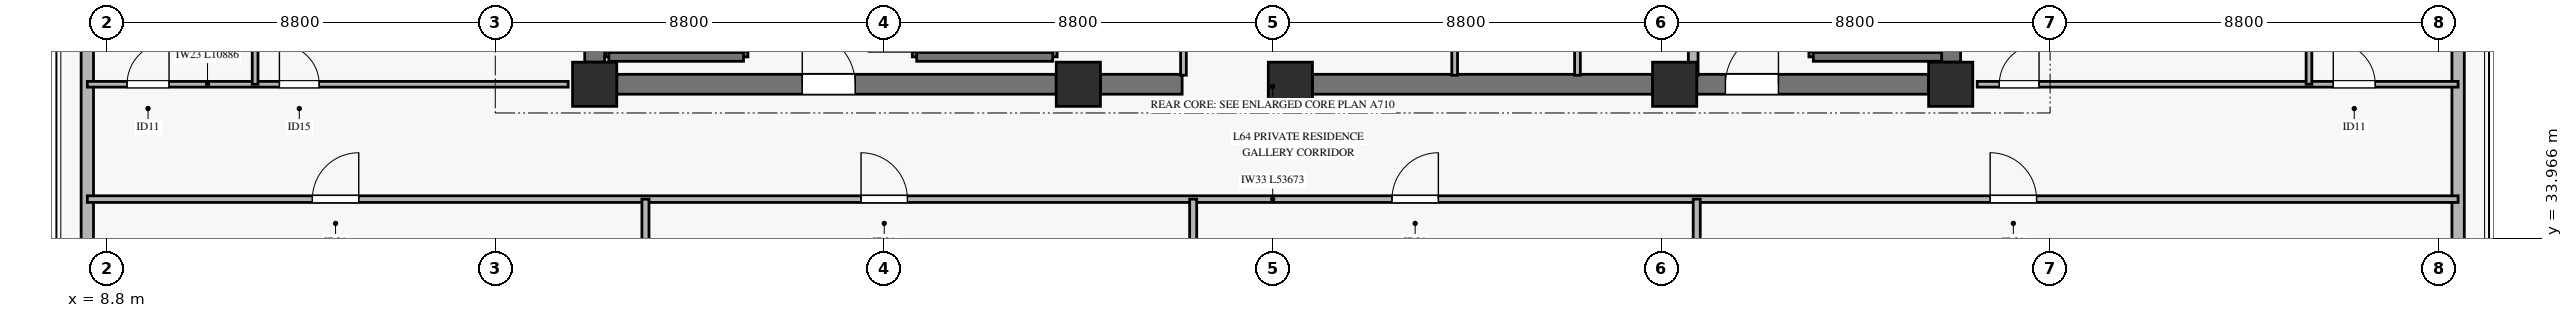
"""IFC4 building model, lengths in metres.
Left out: names, types, materials, properties, quantities, classifications, styles, units other than length and angle.
Written with IfcOpenShell. Run it as: python <this file> out.ifc"""

import sys

from ifc_helpers import new_model, si_unit, direction, frame, frame_2d, origin, origin_2d, place, context, subcontext, project, spatial, rectangle, extrude, source, transform, mapped, element, fill, save


model = new_model("IFC4")
c1 = context("Model", 3, precision=1e-05, world=origin(), true_north=direction((0.0, 1.0)))
c2 = subcontext(c1, "Body", "Model", "MODEL_VIEW")
j1 = project(units=[si_unit("LENGTHUNIT", "METRE"), si_unit("PLANEANGLEUNIT", "RADIAN")], contexts=[c1])
p1 = place(None, origin())
s1 = spatial("IfcSite", under=j1, at=p1, CompositionType="ELEMENT")
p2 = place(p1, origin())
s2 = spatial("IfcBuilding", under=s1, at=p2, CompositionType="ELEMENT")
p3 = place(p2, frame((0.0, 0.0, 251.9)))
s3 = spatial("IfcBuildingStorey", under=s2, at=p3, CompositionType="ELEMENT", Elevation=251.9)
m1 = source(origin(), c2, "Body", "SweptSolid", [
    extrude(rectangle(XDim=1.0, YDim=1.0, at=origin_2d()), origin(), (0.0, 0.0, 1.0), 3.185),
])
for number, where, z_axis, x_axis in (
    (1, (19.85, 37.45, 0.0), (0.0, 0.0, 1.0), (1.0, 0.0, 0.0)),
    (2, (30.8, 37.45, 0.0), (0.0, 0.0, 1.0), (1.0, 0.0, 0.0)),
    (3, (35.6, 37.45, 0.0), (0.0, 0.0, 1.0), (1.0, 0.0, 0.0)),
    (4, (44.3, 37.45, 0.0), (0.0, 0.0, 1.0), (1.0, 0.0, 0.0)),
    (5, (50.55, 37.45, 0.0), (0.0, 0.0, 1.0), (1.0, 0.0, 0.0)),
):
    element("IfcColumn", number, at=place(p3, frame(where, z_axis=z_axis, x_axis=x_axis)), inside=s3, PredefinedType="PILASTER", context=c2, shape_type="MappedRepresentation", body=[
        mapped(m1, transform((0.0, 0.0, 0.0), x_axis=(1.0, 0.0, 0.0), y_axis=(0.0, 1.0, 0.0), z_axis=(0.0, 0.0, 1.0), scale=1.0)),
    ])
p4 = place(p3, frame((20.35, 37.45, 0.0), z_axis=(0.0, 0.0, 1.0), x_axis=(1.0, 0.0, 0.0)))
e6 = element("IfcWall", 6, at=p4, inside=s3, PredefinedType="SHEAR", context=c2, shape_type="SweptSolid", body=[
    extrude(rectangle(XDim=9.95, YDim=0.45, at=frame_2d((4.975, 0.0))), origin(), (0.0, 0.0, 1.0), 3.185),
])
p5 = place(p4, frame((4.2, 0.0, 0.0)))
e7 = element("IfcOpeningElement", 7, at=p5, cuts=e6, PredefinedType="OPENING", context=c2, shape_type="SweptSolid", body=[
    extrude(rectangle(XDim=1.2, YDim=2.15, at=frame_2d((0.6, 1.075))), frame((0.0, 0.235, 0.0), z_axis=(0.0, -1.0, 0.0), x_axis=(1.0, 0.0, 0.0)), (0.0, 0.0, 1.0), 0.47),
])
p6 = place(p3, frame((31.3, 37.45, 0.0), z_axis=(0.0, 0.0, 1.0), x_axis=(1.0, 0.0, 0.0)))
e8 = element("IfcWall", 8, at=p6, inside=s3, PredefinedType="SHEAR", context=c2, shape_type="SweptSolid", body=[
    extrude(rectangle(XDim=1.85, YDim=0.45, at=frame_2d((0.925, 0.0))), origin(), (0.0, 0.0, 1.0), 3.185),
])
p7 = place(p3, frame((36.1, 37.45, 0.0), z_axis=(0.0, 0.0, 1.0), x_axis=(1.0, 0.0, 0.0)))
e9 = element("IfcWall", 9, at=p7, inside=s3, PredefinedType="SHEAR", context=c2, shape_type="SweptSolid", body=[
    extrude(rectangle(XDim=7.7, YDim=0.45, at=frame_2d((3.85, 0.0))), origin(), (0.0, 0.0, 1.0), 3.185),
])
p8 = place(p3, frame((44.8, 37.45, 0.0), z_axis=(0.0, 0.0, 1.0), x_axis=(1.0, 0.0, 0.0)))
e10 = element("IfcWall", 10, at=p8, inside=s3, PredefinedType="SHEAR", context=c2, shape_type="SweptSolid", body=[
    extrude(rectangle(XDim=5.25, YDim=0.45, at=frame_2d((2.625, 0.0))), origin(), (0.0, 0.0, 1.0), 3.185),
])
p9 = place(p8, frame((0.65, 0.0, 0.0)))
e11 = element("IfcOpeningElement", 11, at=p9, cuts=e10, PredefinedType="OPENING", context=c2, shape_type="SweptSolid", body=[
    extrude(rectangle(XDim=1.2, YDim=2.15, at=frame_2d((0.6, 1.075))), frame((0.0, 0.235, 0.0), z_axis=(0.0, -1.0, 0.0), x_axis=(1.0, 0.0, 0.0)), (0.0, 0.0, 1.0), 0.47),
])
for number, where, z_axis, x_axis in (
    (12, (19.85, 37.95, 0.0), (0.0, 0.0, 1.0), (0.0, 1.0, 0.0)),
    (13, (50.55, 37.95, 0.0), (0.0, 0.0, 1.0), (0.0, 1.0, 0.0)),
):
    element("IfcWall", number, at=place(p3, frame(where, z_axis=z_axis, x_axis=x_axis)), inside=s3, PredefinedType="SHEAR", context=c2, shape_type="SweptSolid", body=[
        extrude(rectangle(XDim=8.1, YDim=0.45, at=frame_2d((4.05, 0.0))), origin(), (0.0, 0.0, 1.0), 3.185),
    ])
p10 = place(p3, frame((8.364, 30.857, 0.0), z_axis=(0.0, 0.0, 1.0), x_axis=(0.0, 1.0, 0.0)))
e14 = element("IfcWall", 14, at=p10, inside=s3, PredefinedType="SOLIDWALL", context=c2, shape_type="SweptSolid", body=[
    extrude(rectangle(XDim=12.628, YDim=0.28, at=frame_2d((6.314, 0.0))), origin(), (0.0, 0.0, 1.0), 2.815),
])
p11 = place(p10, frame((7.583, 0.0, 0.45)))
e15 = element("IfcOpeningElement", 15, at=p11, cuts=e14, PredefinedType="OPENING", context=c2, shape_type="SweptSolid", body=[
    extrude(rectangle(XDim=2.2, YDim=2.1, at=frame_2d((1.1, 1.05))), frame((0.0, 0.15, 0.0), z_axis=(0.0, -1.0, 0.0), x_axis=(1.0, 0.0, 0.0)), (0.0, 0.0, 1.0), 0.3),
])
p12 = place(p3, frame((62.037, 30.857, 0.0), z_axis=(0.0, 0.0, 1.0), x_axis=(0.0, 1.0, 0.0)))
e16 = element("IfcWall", 16, at=p12, inside=s3, PredefinedType="SOLIDWALL", context=c2, shape_type="SweptSolid", body=[
    extrude(rectangle(XDim=12.628, YDim=0.28, at=frame_2d((6.314, 0.0))), origin(), (0.0, 0.0, 1.0), 2.815),
])
p13 = place(p12, frame((7.583, 0.0, 0.45)))
e17 = element("IfcOpeningElement", 17, at=p13, cuts=e16, PredefinedType="OPENING", context=c2, shape_type="SweptSolid", body=[
    extrude(rectangle(XDim=2.2, YDim=2.1, at=frame_2d((1.1, 1.05))), frame((0.0, 0.15, 0.0), z_axis=(0.0, -1.0, 0.0), x_axis=(1.0, 0.0, 0.0)), (0.0, 0.0, 1.0), 0.3),
])
p14 = place(p3, frame((20.17, 38.07, 0.0), z_axis=(0.0, 0.0, 1.0), x_axis=(0.0, 1.0, 0.0)))
e18 = element("IfcWall", 18, at=p14, inside=s3, PredefinedType="SOLIDWALL", context=c2, shape_type="SweptSolid", body=[
    extrude(rectangle(XDim=7.25, YDim=0.14, at=frame_2d((3.625, 0.0))), origin(), (0.0, 0.0, 1.0), 3.4),
])
p15 = place(p3, frame((23.22, 38.07, 0.0), z_axis=(0.0, 0.0, 1.0), x_axis=(0.0, 1.0, 0.0)))
e19 = element("IfcWall", 19, at=p15, inside=s3, PredefinedType="SOLIDWALL", context=c2, shape_type="SweptSolid", body=[
    extrude(rectangle(XDim=7.25, YDim=0.2, at=frame_2d((3.625, 0.0))), origin(), (0.0, 0.0, 1.0), 3.4),
])
p16 = place(p15, frame((0.11, 0.0, 0.0)))
e20 = element("IfcOpeningElement", 20, at=p16, cuts=e19, PredefinedType="OPENING", context=c2, shape_type="SweptSolid", body=[
    extrude(rectangle(XDim=1.1, YDim=2.15, at=frame_2d((0.55, 1.075))), frame((0.0, 0.11, 0.0), z_axis=(0.0, -1.0, 0.0), x_axis=(1.0, 0.0, 0.0)), (0.0, 0.0, 1.0), 0.22),
])
p17 = place(p3, frame((20.17, 38.07, 0.0), z_axis=(0.0, 0.0, 1.0), x_axis=(1.0, 0.0, 0.0)))
e21 = element("IfcWall", 21, at=p17, inside=s3, PredefinedType="SOLIDWALL", context=c2, shape_type="SweptSolid", body=[
    extrude(rectangle(XDim=3.05, YDim=0.2, at=frame_2d((1.525, 0.0))), origin(), (0.0, 0.0, 1.0), 3.4),
])
p18 = place(p3, frame((27.14, 38.07, 0.0), z_axis=(0.0, 0.0, 1.0), x_axis=(0.0, 1.0, 0.0)))
e22 = element("IfcWall", 22, at=p18, inside=s3, PredefinedType="SOLIDWALL", context=c2, shape_type="SweptSolid", body=[
    extrude(rectangle(XDim=7.25, YDim=0.2, at=frame_2d((3.625, 0.0))), origin(), (0.0, 0.0, 1.0), 3.4),
])
p19 = place(p18, frame((0.11, 0.0, 0.0)))
e23 = element("IfcOpeningElement", 23, at=p19, cuts=e22, PredefinedType="OPENING", context=c2, shape_type="SweptSolid", body=[
    extrude(rectangle(XDim=1.1, YDim=2.15, at=frame_2d((0.55, 1.075))), frame((0.0, 0.11, 0.0), z_axis=(0.0, -1.0, 0.0), x_axis=(1.0, 0.0, 0.0)), (0.0, 0.0, 1.0), 0.22),
])
p20 = place(p3, frame((30.22, 38.07, 0.0), z_axis=(0.0, 0.0, 1.0), x_axis=(0.0, 1.0, 0.0)))
e24 = element("IfcWall", 24, at=p20, inside=s3, PredefinedType="SOLIDWALL", context=c2, shape_type="SweptSolid", body=[
    extrude(rectangle(XDim=7.25, YDim=0.2, at=frame_2d((3.625, 0.0))), origin(), (0.0, 0.0, 1.0), 3.4),
])
p21 = place(p3, frame((27.14, 38.07, 0.0), z_axis=(0.0, 0.0, 1.0), x_axis=(1.0, 0.0, 0.0)))
e25 = element("IfcWall", 25, at=p21, inside=s3, PredefinedType="SOLIDWALL", context=c2, shape_type="SweptSolid", body=[
    extrude(rectangle(XDim=3.08, YDim=0.2, at=frame_2d((1.54, 0.0))), origin(), (0.0, 0.0, 1.0), 3.4),
])
p22 = place(p3, frame((47.44, 38.07, 0.0), z_axis=(0.0, 0.0, 1.0), x_axis=(0.0, 1.0, 0.0)))
e26 = element("IfcWall", 26, at=p22, inside=s3, PredefinedType="SOLIDWALL", context=c2, shape_type="SweptSolid", body=[
    extrude(rectangle(XDim=7.25, YDim=0.2, at=frame_2d((3.625, 0.0))), origin(), (0.0, 0.0, 1.0), 3.4),
])
p23 = place(p22, frame((0.11, 0.0, 0.0)))
e27 = element("IfcOpeningElement", 27, at=p23, cuts=e26, PredefinedType="OPENING", context=c2, shape_type="SweptSolid", body=[
    extrude(rectangle(XDim=1.1, YDim=2.15, at=frame_2d((0.55, 1.075))), frame((0.0, 0.11, 0.0), z_axis=(0.0, -1.0, 0.0), x_axis=(1.0, 0.0, 0.0)), (0.0, 0.0, 1.0), 0.22),
])
p24 = place(p3, frame((47.44, 38.07, 0.0), z_axis=(0.0, 0.0, 1.0), x_axis=(1.0, 0.0, 0.0)))
e28 = element("IfcWall", 28, at=p24, inside=s3, PredefinedType="SOLIDWALL", context=c2, shape_type="SweptSolid", body=[
    extrude(rectangle(XDim=2.905, YDim=0.2, at=frame_2d((1.453, 0.0))), origin(), (0.0, 0.0, 1.0), 3.4),
])
p25 = place(p3, frame((44.72, 37.655, 0.0), z_axis=(0.0, 0.0, 1.0), x_axis=(0.0, 1.0, 0.0)))
e29 = element("IfcWall", 29, at=p25, inside=s3, PredefinedType="SOLIDWALL", context=c2, shape_type="SweptSolid", body=[
    extrude(rectangle(XDim=7.565, YDim=0.22, at=frame_2d((3.782, 0.0))), origin(), (0.0, 0.0, 1.0), 3.185),
])
p26 = place(p3, frame((33.18, 37.655, 0.0), z_axis=(0.0, 0.0, 1.0), x_axis=(0.0, 1.0, 0.0)))
e30 = element("IfcWall", 30, at=p26, inside=s3, PredefinedType="PARTITIONING", context=c2, shape_type="SweptSolid", body=[
    extrude(rectangle(XDim=6.495, YDim=0.13, at=frame_2d((3.248, 0.0))), origin(), (0.0, 0.0, 1.0), 2.27),
])
p27 = place(p26, frame((2.245, 0.0, 0.0)))
e31 = element("IfcOpeningElement", 31, at=p27, cuts=e30, PredefinedType="OPENING", context=c2, shape_type="SweptSolid", body=[
    extrude(rectangle(XDim=0.9, YDim=2.1, at=frame_2d((0.45, 1.05))), frame((0.0, 0.075, 0.0), z_axis=(0.0, -1.0, 0.0), x_axis=(1.0, 0.0, 0.0)), (0.0, 0.0, 1.0), 0.15),
])
p28 = place(p3, frame((39.32, 37.655, 0.0), z_axis=(0.0, 0.0, 1.0), x_axis=(0.0, 1.0, 0.0)))
e32 = element("IfcWall", 32, at=p28, inside=s3, PredefinedType="PARTITIONING", context=c2, shape_type="SweptSolid", body=[
    extrude(rectangle(XDim=8.69, YDim=0.13, at=frame_2d((4.345, 0.0))), origin(), (0.0, 0.0, 1.0), 3.185),
])
p29 = place(p28, frame((4.865, 0.0, 0.0)))
e33 = element("IfcOpeningElement", 33, at=p29, cuts=e32, PredefinedType="OPENING", context=c2, shape_type="SweptSolid", body=[
    extrude(rectangle(XDim=0.9, YDim=2.1, at=frame_2d((0.45, 1.05))), frame((0.0, 0.075, 0.0), z_axis=(0.0, -1.0, 0.0), x_axis=(1.0, 0.0, 0.0)), (0.0, 0.0, 1.0), 0.15),
])
p30 = place(p3, frame((42.1, 37.655, 0.0), z_axis=(0.0, 0.0, 1.0), x_axis=(0.0, 1.0, 0.0)))
e34 = element("IfcWall", 34, at=p30, inside=s3, PredefinedType="PARTITIONING", context=c2, shape_type="SweptSolid", body=[
    extrude(rectangle(XDim=8.69, YDim=0.13, at=frame_2d((4.345, 0.0))), origin(), (0.0, 0.0, 1.0), 3.185),
])
p31 = place(p30, frame((2.145, 0.0, 0.0)))
e35 = element("IfcOpeningElement", 35, at=p31, cuts=e34, PredefinedType="OPENING", context=c2, shape_type="SweptSolid", body=[
    extrude(rectangle(XDim=0.9, YDim=2.1, at=frame_2d((0.45, 1.05))), frame((0.0, 0.075, 0.0), z_axis=(0.0, -1.0, 0.0), x_axis=(1.0, 0.0, 0.0)), (0.0, 0.0, 1.0), 0.15),
])
p32 = place(p3, frame((8.364, 34.85, 0.0), z_axis=(0.0, 0.0, 1.0), x_axis=(1.0, 0.0, 0.0)))
e36 = element("IfcWall", 36, at=p32, inside=s3, PredefinedType="PARTITIONING", context=c2, shape_type="SweptSolid", body=[
    extrude(rectangle(XDim=53.673, YDim=0.15, at=frame_2d((26.836, 0.0))), origin(), (0.0, 0.0, 1.0), 2.47),
])
p33 = place(p32, frame((5.095, 0.0, 0.0)))
e37 = element("IfcOpeningElement", 37, at=p33, cuts=e36, PredefinedType="OPENING", context=c2, shape_type="SweptSolid", body=[
    extrude(rectangle(XDim=1.05, YDim=2.15, at=frame_2d((0.525, 1.075))), frame((0.0, 0.085, 0.0), z_axis=(0.0, -1.0, 0.0), x_axis=(1.0, 0.0, 0.0)), (0.0, 0.0, 1.0), 0.17),
])
p34 = place(p32, frame((17.517, 0.0, 0.0)))
e38 = element("IfcOpeningElement", 38, at=p34, cuts=e36, PredefinedType="OPENING", context=c2, shape_type="SweptSolid", body=[
    extrude(rectangle(XDim=1.05, YDim=2.15, at=frame_2d((0.525, 1.075))), frame((0.0, 0.085, 0.0), z_axis=(0.0, -1.0, 0.0), x_axis=(1.0, 0.0, 0.0)), (0.0, 0.0, 1.0), 0.17),
])
p35 = place(p32, frame((29.537, 0.0, 0.0)))
e39 = element("IfcOpeningElement", 39, at=p35, cuts=e36, PredefinedType="OPENING", context=c2, shape_type="SweptSolid", body=[
    extrude(rectangle(XDim=1.05, YDim=2.15, at=frame_2d((0.525, 1.075))), frame((0.0, 0.085, 0.0), z_axis=(0.0, -1.0, 0.0), x_axis=(1.0, 0.0, 0.0)), (0.0, 0.0, 1.0), 0.17),
])
p36 = place(p32, frame((43.079, 0.0, 0.0)))
e40 = element("IfcOpeningElement", 40, at=p36, cuts=e36, PredefinedType="OPENING", context=c2, shape_type="SweptSolid", body=[
    extrude(rectangle(XDim=1.05, YDim=2.15, at=frame_2d((0.525, 1.075))), frame((0.0, 0.085, 0.0), z_axis=(0.0, -1.0, 0.0), x_axis=(1.0, 0.0, 0.0)), (0.0, 0.0, 1.0), 0.17),
])
for number, where, z_axis, x_axis in (
    (41, (21.0, 15.113, 0.0), (0.0, 0.0, 1.0), (0.0, 1.0, 0.0)),
    (42, (33.4, 15.113, 0.0), (0.0, 0.0, 1.0), (0.0, 1.0, 0.0)),
    (43, (44.8, 15.113, 0.0), (0.0, 0.0, 1.0), (0.0, 1.0, 0.0)),
):
    element("IfcWall", number, at=place(p3, frame(where, z_axis=z_axis, x_axis=x_axis)), inside=s3, PredefinedType="PARTITIONING", context=c2, shape_type="SweptSolid", body=[
        extrude(rectangle(XDim=19.737, YDim=0.16, at=frame_2d((9.869, 0.0))), origin(), (0.0, 0.0, 1.0), 2.77),
    ])
p37 = place(p3, frame((8.364, 37.45, 0.0), z_axis=(0.0, 0.0, 1.0), x_axis=(1.0, 0.0, 0.0)))
e44 = element("IfcWall", 44, at=p37, inside=s3, PredefinedType="PARTITIONING", context=c2, shape_type="SweptSolid", body=[
    extrude(rectangle(XDim=10.886, YDim=0.13, at=frame_2d((5.443, 0.0))), origin(), (0.0, 0.0, 1.0), 2.82),
])
p38 = place(p37, frame((0.9, 0.0, 0.0)))
e45 = element("IfcOpeningElement", 45, at=p38, cuts=e44, PredefinedType="OPENING", context=c2, shape_type="SweptSolid", body=[
    extrude(rectangle(XDim=0.95, YDim=2.1, at=frame_2d((0.475, 1.05))), frame((0.0, 0.075, 0.0), z_axis=(0.0, -1.0, 0.0), x_axis=(1.0, 0.0, 0.0)), (0.0, 0.0, 1.0), 0.15),
])
p39 = place(p37, frame((4.349, 0.0, 0.0)))
e46 = element("IfcOpeningElement", 46, at=p39, cuts=e44, PredefinedType="OPENING", context=c2, shape_type="SweptSolid", body=[
    extrude(rectangle(XDim=0.9, YDim=2.1, at=frame_2d((0.45, 1.05))), frame((0.0, 0.075, 0.0), z_axis=(0.0, -1.0, 0.0), x_axis=(1.0, 0.0, 0.0)), (0.0, 0.0, 1.0), 0.15),
])
p40 = place(p3, frame((12.163, 37.45, 0.0), z_axis=(0.0, 0.0, 1.0), x_axis=(0.0, 1.0, 0.0)))
e47 = element("IfcWall", 47, at=p40, inside=s3, PredefinedType="PARTITIONING", context=c2, shape_type="SweptSolid", body=[
    extrude(rectangle(XDim=8.8, YDim=0.13, at=frame_2d((4.4, 0.0))), origin(), (0.0, 0.0, 1.0), 3.185),
])
p41 = place(p3, frame((51.15, 37.45, 0.0), z_axis=(0.0, 0.0, 1.0), x_axis=(1.0, 0.0, 0.0)))
e48 = element("IfcWall", 48, at=p41, inside=s3, PredefinedType="PARTITIONING", context=c2, shape_type="SweptSolid", body=[
    extrude(rectangle(XDim=10.887, YDim=0.13, at=frame_2d((5.444, 0.0))), origin(), (0.0, 0.0, 1.0), 2.82),
])
p42 = place(p41, frame((0.5, 0.0, 0.0)))
e49 = element("IfcOpeningElement", 49, at=p42, cuts=e48, PredefinedType="OPENING", context=c2, shape_type="SweptSolid", body=[
    extrude(rectangle(XDim=0.9, YDim=2.1, at=frame_2d((0.45, 1.05))), frame((0.0, 0.075, 0.0), z_axis=(0.0, -1.0, 0.0), x_axis=(1.0, 0.0, 0.0)), (0.0, 0.0, 1.0), 0.15),
])
p43 = place(p41, frame((8.061, 0.0, 0.0)))
e50 = element("IfcOpeningElement", 50, at=p43, cuts=e48, PredefinedType="OPENING", context=c2, shape_type="SweptSolid", body=[
    extrude(rectangle(XDim=0.95, YDim=2.1, at=frame_2d((0.475, 1.05))), frame((0.0, 0.075, 0.0), z_axis=(0.0, -1.0, 0.0), x_axis=(1.0, 0.0, 0.0)), (0.0, 0.0, 1.0), 0.15),
])
p44 = place(p3, frame((58.661, 37.45, 0.0), z_axis=(0.0, 0.0, 1.0), x_axis=(0.0, 1.0, 0.0)))
e51 = element("IfcWall", 51, at=p44, inside=s3, PredefinedType="PARTITIONING", context=c2, shape_type="SweptSolid", body=[
    extrude(rectangle(XDim=8.8, YDim=0.13, at=frame_2d((4.4, 0.0))), origin(), (0.0, 0.0, 1.0), 3.185),
])
m2 = source(origin(), c2, "Body", "SweptSolid", [
    extrude(rectangle(XDim=1.2, YDim=2.15, at=frame_2d((0.6, 1.075))), frame((0.0, 0.025, 0.0), z_axis=(0.0, -1.0, 0.0), x_axis=(1.0, 0.0, 0.0)), (0.0, 0.0, 1.0), 0.05),
])
p45 = place(p5, origin())
e52 = element("IfcDoor", 52, at=p45, inside=s3, OperationType="SINGLE_SWING_LEFT", PredefinedType="DOOR", context=c2, shape_type="MappedRepresentation", body=[
    mapped(m2, transform((0.0, 0.0, 0.0), x_axis=(1.0, 0.0, 0.0), y_axis=(0.0, 1.0, 0.0), z_axis=(0.0, 0.0, 1.0), scale=1.0)),
])
fill(e7, e52)
p46 = place(p9, origin())
e53 = element("IfcDoor", 53, at=p46, inside=s3, OperationType="SINGLE_SWING_RIGHT", PredefinedType="DOOR", context=c2, shape_type="MappedRepresentation", body=[
    mapped(m2, transform((0.0, 0.0, 0.0), x_axis=(1.0, 0.0, 0.0), y_axis=(0.0, 1.0, 0.0), z_axis=(0.0, 0.0, 1.0), scale=1.0)),
])
fill(e11, e53)
m3 = source(origin(), c2, "Body", "SweptSolid", [
    extrude(rectangle(XDim=1.05, YDim=2.15, at=frame_2d((0.525, 1.075))), frame((0.0, 0.025, 0.0), z_axis=(0.0, -1.0, 0.0), x_axis=(1.0, 0.0, 0.0)), (0.0, 0.0, 1.0), 0.05),
])
p47 = place(p33, origin())
e54 = element("IfcDoor", 54, at=p47, inside=s3, OperationType="SINGLE_SWING_RIGHT", PredefinedType="DOOR", context=c2, shape_type="MappedRepresentation", body=[
    mapped(m3, transform((0.0, 0.0, 0.0), x_axis=(1.0, 0.0, 0.0), y_axis=(0.0, 1.0, 0.0), z_axis=(0.0, 0.0, 1.0), scale=1.0)),
])
fill(e37, e54)
p48 = place(p34, origin())
e55 = element("IfcDoor", 55, at=p48, inside=s3, OperationType="SINGLE_SWING_LEFT", PredefinedType="DOOR", context=c2, shape_type="MappedRepresentation", body=[
    mapped(m3, transform((0.0, 0.0, 0.0), x_axis=(1.0, 0.0, 0.0), y_axis=(0.0, 1.0, 0.0), z_axis=(0.0, 0.0, 1.0), scale=1.0)),
])
fill(e38, e55)
p49 = place(p35, origin())
e56 = element("IfcDoor", 56, at=p49, inside=s3, OperationType="SINGLE_SWING_RIGHT", PredefinedType="DOOR", context=c2, shape_type="MappedRepresentation", body=[
    mapped(m3, transform((0.0, 0.0, 0.0), x_axis=(1.0, 0.0, 0.0), y_axis=(0.0, 1.0, 0.0), z_axis=(0.0, 0.0, 1.0), scale=1.0)),
])
fill(e39, e56)
p50 = place(p36, origin())
e57 = element("IfcDoor", 57, at=p50, inside=s3, OperationType="SINGLE_SWING_LEFT", PredefinedType="DOOR", context=c2, shape_type="MappedRepresentation", body=[
    mapped(m3, transform((0.0, 0.0, 0.0), x_axis=(1.0, 0.0, 0.0), y_axis=(0.0, 1.0, 0.0), z_axis=(0.0, 0.0, 1.0), scale=1.0)),
])
fill(e40, e57)
m4 = source(origin(), c2, "Body", "SweptSolid", [
    extrude(rectangle(XDim=0.95, YDim=2.1, at=frame_2d((0.475, 1.05))), frame((0.0, 0.025, 0.0), z_axis=(0.0, -1.0, 0.0), x_axis=(1.0, 0.0, 0.0)), (0.0, 0.0, 1.0), 0.05),
])
p51 = place(p38, origin())
e58 = element("IfcDoor", 58, at=p51, inside=s3, OperationType="SINGLE_SWING_RIGHT", PredefinedType="DOOR", context=c2, shape_type="MappedRepresentation", body=[
    mapped(m4, transform((0.0, 0.0, 0.0), x_axis=(1.0, 0.0, 0.0), y_axis=(0.0, 1.0, 0.0), z_axis=(0.0, 0.0, 1.0), scale=1.0)),
])
fill(e45, e58)
m5 = source(origin(), c2, "Body", "SweptSolid", [
    extrude(rectangle(XDim=0.9, YDim=2.1, at=frame_2d((0.45, 1.05))), frame((0.0, 0.025, 0.0), z_axis=(0.0, -1.0, 0.0), x_axis=(1.0, 0.0, 0.0)), (0.0, 0.0, 1.0), 0.05),
])
p52 = place(p39, origin())
e59 = element("IfcDoor", 59, at=p52, inside=s3, OperationType="SINGLE_SWING_LEFT", PredefinedType="DOOR", context=c2, shape_type="MappedRepresentation", body=[
    mapped(m5, transform((0.0, 0.0, 0.0), x_axis=(1.0, 0.0, 0.0), y_axis=(0.0, 1.0, 0.0), z_axis=(0.0, 0.0, 1.0), scale=1.0)),
])
fill(e46, e59)
p53 = place(p42, origin())
e60 = element("IfcDoor", 60, at=p53, inside=s3, OperationType="SINGLE_SWING_RIGHT", PredefinedType="DOOR", context=c2, shape_type="MappedRepresentation", body=[
    mapped(m5, transform((0.0, 0.0, 0.0), x_axis=(1.0, 0.0, 0.0), y_axis=(0.0, 1.0, 0.0), z_axis=(0.0, 0.0, 1.0), scale=1.0)),
])
fill(e49, e60)
p54 = place(p43, origin())
e61 = element("IfcDoor", 61, at=p54, inside=s3, OperationType="SINGLE_SWING_LEFT", PredefinedType="DOOR", context=c2, shape_type="MappedRepresentation", body=[
    mapped(m4, transform((0.0, 0.0, 0.0), x_axis=(1.0, 0.0, 0.0), y_axis=(0.0, 1.0, 0.0), z_axis=(0.0, 0.0, 1.0), scale=1.0)),
])
fill(e50, e61)
save(model, sys.argv[1])
